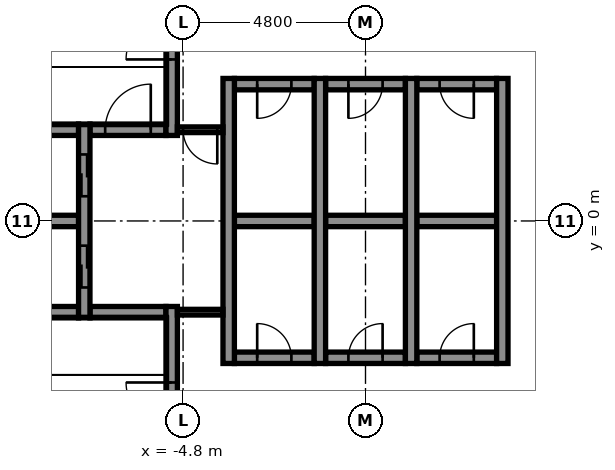
"""IFC4 building model, lengths in metres.
Left out: names, types, materials, properties, quantities, classifications, styles, units other than length and angle.
Written with IfcOpenShell. Run it as: python <this file> out.ifc"""

import sys

from ifc_helpers import new_model, si_unit, direction, frame, frame_2d, origin, place, context, subcontext, project, spatial, rectangle, extrude, element, fill, save


model = new_model("IFC4")
c1 = context("Model", 3, precision=1e-05, world=origin(), true_north=direction((0.0, 1.0)))
c2 = subcontext(c1, "Body", "Model", "MODEL_VIEW")
j1 = project(units=[si_unit("LENGTHUNIT", "METRE"), si_unit("PLANEANGLEUNIT", "RADIAN")], contexts=[c1])
p1 = place(None, origin())
s1 = spatial("IfcSite", under=j1, at=p1, CompositionType="ELEMENT")
p2 = place(p1, origin())
s2 = spatial("IfcBuilding", under=s1, at=p2, CompositionType="ELEMENT")
p3 = place(p2, frame((0.0, 0.0, 66.4)))
s3 = spatial("IfcBuildingStorey", under=s2, at=p3, CompositionType="ELEMENT", Elevation=66.4)
p4 = place(p3, frame((-3.45, -3.6, -0.3), z_axis=(0.0, 0.0, 1.0), x_axis=(1.0, 0.0, 0.0)))
e1 = element("IfcWall", 1, at=p4, inside=s3, PredefinedType="STANDARD", context=c2, shape_type="SweptSolid", body=[
    extrude(rectangle(XDim=2.1, YDim=0.3, at=frame_2d((1.05, 0.0))), origin(), (0.0, 0.0, 1.0), 5.5),
])
p5 = place(p4, frame((0.6, 0.0, 0.3)))
e2 = element("IfcOpeningElement", 2, at=p5, cuts=e1, PredefinedType="OPENING", context=c2, shape_type="SweptSolid", body=[
    extrude(rectangle(XDim=0.9, YDim=2.1, at=frame_2d((0.45, 1.05))), frame((0.0, 0.16, 0.0), z_axis=(0.0, -1.0, 0.0), x_axis=(1.0, 0.0, 0.0)), (0.0, 0.0, 1.0), 0.32),
])
p6 = place(p3, frame((-1.05, -3.6, -0.3), z_axis=(0.0, 0.0, 1.0), x_axis=(1.0, 0.0, 0.0)))
e3 = element("IfcWall", 3, at=p6, inside=s3, PredefinedType="STANDARD", context=c2, shape_type="SweptSolid", body=[
    extrude(rectangle(XDim=2.1, YDim=0.3, at=frame_2d((1.05, 0.0))), origin(), (0.0, 0.0, 1.0), 5.5),
])
p7 = place(p6, frame((0.6, 0.0, 0.3)))
e4 = element("IfcOpeningElement", 4, at=p7, cuts=e3, PredefinedType="OPENING", context=c2, shape_type="SweptSolid", body=[
    extrude(rectangle(XDim=0.9, YDim=2.1, at=frame_2d((0.45, 1.05))), frame((0.0, 0.16, 0.0), z_axis=(0.0, -1.0, 0.0), x_axis=(1.0, 0.0, 0.0)), (0.0, 0.0, 1.0), 0.32),
])
p8 = place(p3, frame((1.35, -3.6, -0.3), z_axis=(0.0, 0.0, 1.0), x_axis=(1.0, 0.0, 0.0)))
e5 = element("IfcWall", 5, at=p8, inside=s3, PredefinedType="STANDARD", context=c2, shape_type="SweptSolid", body=[
    extrude(rectangle(XDim=2.1, YDim=0.3, at=frame_2d((1.05, 0.0))), origin(), (0.0, 0.0, 1.0), 5.5),
])
p9 = place(p8, frame((0.6, 0.0, 0.3)))
e6 = element("IfcOpeningElement", 6, at=p9, cuts=e5, PredefinedType="OPENING", context=c2, shape_type="SweptSolid", body=[
    extrude(rectangle(XDim=0.9, YDim=2.1, at=frame_2d((0.45, 1.05))), frame((0.0, 0.16, 0.0), z_axis=(0.0, -1.0, 0.0), x_axis=(1.0, 0.0, 0.0)), (0.0, 0.0, 1.0), 0.32),
])
p10 = place(p3, frame((-9.45, -2.4, -0.3), z_axis=(0.0, 0.0, 1.0), x_axis=(1.0, 0.0, 0.0)))
e7 = element("IfcWall", 7, at=p10, inside=s3, PredefinedType="STANDARD", context=c2, shape_type="SweptSolid", body=[
    extrude(rectangle(XDim=1.9, YDim=0.3, at=frame_2d((0.95, 0.0))), origin(), (0.0, 0.0, 1.0), 5.5),
])
p11 = place(p3, frame((-7.25, -2.4, -0.3), z_axis=(0.0, 0.0, 1.0), x_axis=(1.0, 0.0, 0.0)))
e8 = element("IfcWall", 8, at=p11, inside=s3, PredefinedType="STANDARD", context=c2, shape_type="SweptSolid", body=[
    extrude(rectangle(XDim=2.0, YDim=0.3, at=frame_2d((1.0, 0.0))), origin(), (0.0, 0.0, 1.0), 5.5),
])
p12 = place(p3, frame((-10.85, 0.0, -0.3), z_axis=(0.0, 0.0, 1.0), x_axis=(1.0, 0.0, 0.0)))
e9 = element("IfcWall", 9, at=p12, inside=s3, PredefinedType="STANDARD", context=c2, shape_type="SweptSolid", body=[
    extrude(rectangle(XDim=3.3, YDim=0.3, at=frame_2d((1.65, 0.0))), origin(), (0.0, 0.0, 1.0), 5.5),
])
p13 = place(p3, frame((-3.45, 0.0, -0.3), z_axis=(0.0, 0.0, 1.0), x_axis=(1.0, 0.0, 0.0)))
e10 = element("IfcWall", 10, at=p13, inside=s3, PredefinedType="STANDARD", context=c2, shape_type="SweptSolid", body=[
    extrude(rectangle(XDim=2.1, YDim=0.3, at=frame_2d((1.05, 0.0))), origin(), (0.0, 0.0, 1.0), 5.5),
])
p14 = place(p3, frame((-1.05, 0.0, -0.3), z_axis=(0.0, 0.0, 1.0), x_axis=(1.0, 0.0, 0.0)))
e11 = element("IfcWall", 11, at=p14, inside=s3, PredefinedType="STANDARD", context=c2, shape_type="SweptSolid", body=[
    extrude(rectangle(XDim=2.1, YDim=0.3, at=frame_2d((1.05, 0.0))), origin(), (0.0, 0.0, 1.0), 5.5),
])
p15 = place(p3, frame((1.35, 0.0, -0.3), z_axis=(0.0, 0.0, 1.0), x_axis=(1.0, 0.0, 0.0)))
e12 = element("IfcWall", 12, at=p15, inside=s3, PredefinedType="STANDARD", context=c2, shape_type="SweptSolid", body=[
    extrude(rectangle(XDim=2.1, YDim=0.3, at=frame_2d((1.05, 0.0))), origin(), (0.0, 0.0, 1.0), 5.5),
])
p16 = place(p3, frame((-9.45, 2.4, -0.3), z_axis=(0.0, 0.0, 1.0), x_axis=(1.0, 0.0, 0.0)))
e13 = element("IfcWall", 13, at=p16, inside=s3, PredefinedType="STANDARD", context=c2, shape_type="SweptSolid", body=[
    extrude(rectangle(XDim=1.9, YDim=0.3, at=frame_2d((0.95, 0.0))), origin(), (0.0, 0.0, 1.0), 5.5),
])
p17 = place(p3, frame((-7.25, 2.4, -0.3), z_axis=(0.0, 0.0, 1.0), x_axis=(1.0, 0.0, 0.0)))
e14 = element("IfcWall", 14, at=p17, inside=s3, PredefinedType="STANDARD", context=c2, shape_type="SweptSolid", body=[
    extrude(rectangle(XDim=2.0, YDim=0.3, at=frame_2d((1.0, 0.0))), origin(), (0.0, 0.0, 1.0), 5.5),
])
p18 = place(p17, frame((0.4, 0.0, 0.3)))
e15 = element("IfcOpeningElement", 15, at=p18, cuts=e14, PredefinedType="OPENING", context=c2, shape_type="SweptSolid", body=[
    extrude(rectangle(XDim=1.2, YDim=2.1, at=frame_2d((0.6, 1.05))), frame((0.0, 0.16, 0.0), z_axis=(0.0, -1.0, 0.0), x_axis=(1.0, 0.0, 0.0)), (0.0, 0.0, 1.0), 0.32),
])
p19 = place(p3, frame((-3.45, 3.6, -0.3), z_axis=(0.0, 0.0, 1.0), x_axis=(1.0, 0.0, 0.0)))
e16 = element("IfcWall", 16, at=p19, inside=s3, PredefinedType="STANDARD", context=c2, shape_type="SweptSolid", body=[
    extrude(rectangle(XDim=2.1, YDim=0.3, at=frame_2d((1.05, 0.0))), origin(), (0.0, 0.0, 1.0), 5.5),
])
p20 = place(p19, frame((0.6, 0.0, 0.3)))
e17 = element("IfcOpeningElement", 17, at=p20, cuts=e16, PredefinedType="OPENING", context=c2, shape_type="SweptSolid", body=[
    extrude(rectangle(XDim=0.9, YDim=2.1, at=frame_2d((0.45, 1.05))), frame((0.0, 0.16, 0.0), z_axis=(0.0, -1.0, 0.0), x_axis=(1.0, 0.0, 0.0)), (0.0, 0.0, 1.0), 0.32),
])
p21 = place(p3, frame((-1.05, 3.6, -0.3), z_axis=(0.0, 0.0, 1.0), x_axis=(1.0, 0.0, 0.0)))
e18 = element("IfcWall", 18, at=p21, inside=s3, PredefinedType="STANDARD", context=c2, shape_type="SweptSolid", body=[
    extrude(rectangle(XDim=2.1, YDim=0.3, at=frame_2d((1.05, 0.0))), origin(), (0.0, 0.0, 1.0), 5.5),
])
p22 = place(p21, frame((0.6, 0.0, 0.3)))
e19 = element("IfcOpeningElement", 19, at=p22, cuts=e18, PredefinedType="OPENING", context=c2, shape_type="SweptSolid", body=[
    extrude(rectangle(XDim=0.9, YDim=2.1, at=frame_2d((0.45, 1.05))), frame((0.0, 0.16, 0.0), z_axis=(0.0, -1.0, 0.0), x_axis=(1.0, 0.0, 0.0)), (0.0, 0.0, 1.0), 0.32),
])
p23 = place(p3, frame((1.35, 3.6, -0.3), z_axis=(0.0, 0.0, 1.0), x_axis=(1.0, 0.0, 0.0)))
e20 = element("IfcWall", 20, at=p23, inside=s3, PredefinedType="STANDARD", context=c2, shape_type="SweptSolid", body=[
    extrude(rectangle(XDim=2.1, YDim=0.3, at=frame_2d((1.05, 0.0))), origin(), (0.0, 0.0, 1.0), 5.5),
])
p24 = place(p23, frame((0.6, 0.0, 0.3)))
e21 = element("IfcOpeningElement", 21, at=p24, cuts=e20, PredefinedType="OPENING", context=c2, shape_type="SweptSolid", body=[
    extrude(rectangle(XDim=0.9, YDim=2.1, at=frame_2d((0.45, 1.05))), frame((0.0, 0.16, 0.0), z_axis=(0.0, -1.0, 0.0), x_axis=(1.0, 0.0, 0.0)), (0.0, 0.0, 1.0), 0.32),
])
p25 = place(p3, frame((-7.4, -2.55, -0.3), z_axis=(0.0, 0.0, 1.0), x_axis=(0.0, 1.0, 0.0)))
e22 = element("IfcWall", 22, at=p25, inside=s3, PredefinedType="STANDARD", context=c2, shape_type="SweptSolid", body=[
    extrude(rectangle(XDim=5.1, YDim=0.3, at=frame_2d((2.55, 0.0))), origin(), (0.0, 0.0, 1.0), 5.5),
])
p26 = place(p25, frame((0.8, 0.0, 0.3)))
e23 = element("IfcOpeningElement", 23, at=p26, cuts=e22, PredefinedType="OPENING", context=c2, shape_type="SweptSolid", body=[
    extrude(rectangle(XDim=1.1, YDim=2.1, at=frame_2d((0.55, 1.05))), frame((0.0, 0.16, 0.0), z_axis=(0.0, -1.0, 0.0), x_axis=(1.0, 0.0, 0.0)), (0.0, 0.0, 1.0), 0.32),
])
p27 = place(p25, frame((3.2, 0.0, 0.3)))
e24 = element("IfcOpeningElement", 24, at=p27, cuts=e22, PredefinedType="OPENING", context=c2, shape_type="SweptSolid", body=[
    extrude(rectangle(XDim=1.1, YDim=2.1, at=frame_2d((0.55, 1.05))), frame((0.0, 0.16, 0.0), z_axis=(0.0, -1.0, 0.0), x_axis=(1.0, 0.0, 0.0)), (0.0, 0.0, 1.0), 0.32),
])
p28 = place(p3, frame((-5.1, -9.05, -0.3), z_axis=(0.0, 0.0, 1.0), x_axis=(0.0, 1.0, 0.0)))
e25 = element("IfcWall", 25, at=p28, inside=s3, PredefinedType="STANDARD", context=c2, shape_type="SweptSolid", body=[
    extrude(rectangle(XDim=6.8, YDim=0.3, at=frame_2d((3.4, 0.0))), origin(), (0.0, 0.0, 1.0), 5.5),
])
p29 = place(p28, frame((3.6, 0.0, 0.3)))
e26 = element("IfcOpeningElement", 26, at=p29, cuts=e25, PredefinedType="OPENING", context=c2, shape_type="SweptSolid", body=[
    extrude(rectangle(XDim=1.2, YDim=2.1, at=frame_2d((0.6, 1.05))), frame((0.0, 0.16, 0.0), z_axis=(0.0, -1.0, 0.0), x_axis=(1.0, 0.0, 0.0)), (0.0, 0.0, 1.0), 0.32),
])
p30 = place(p3, frame((-5.1, 2.25, -0.3), z_axis=(0.0, 0.0, 1.0), x_axis=(0.0, 1.0, 0.0)))
e27 = element("IfcWall", 27, at=p30, inside=s3, PredefinedType="STANDARD", context=c2, shape_type="SweptSolid", body=[
    extrude(rectangle(XDim=6.8, YDim=0.3, at=frame_2d((3.4, 0.0))), origin(), (0.0, 0.0, 1.0), 5.5),
])
p31 = place(p30, frame((2.0, 0.0, 0.3)))
e28 = element("IfcOpeningElement", 28, at=p31, cuts=e27, PredefinedType="OPENING", context=c2, shape_type="SweptSolid", body=[
    extrude(rectangle(XDim=1.2, YDim=2.1, at=frame_2d((0.6, 1.05))), frame((0.0, 0.16, 0.0), z_axis=(0.0, -1.0, 0.0), x_axis=(1.0, 0.0, 0.0)), (0.0, 0.0, 1.0), 0.32),
])
for number, where, z_axis, x_axis in (
    (29, (-3.6, -3.75, -0.3), (0.0, 0.0, 1.0), (0.0, 1.0, 0.0)),
    (30, (-1.2, -3.75, -0.3), (0.0, 0.0, 1.0), (0.0, 1.0, 0.0)),
    (31, (1.2, -3.75, -0.3), (0.0, 0.0, 1.0), (0.0, 1.0, 0.0)),
    (32, (3.6, -3.75, -0.3), (0.0, 0.0, 1.0), (0.0, 1.0, 0.0)),
):
    element("IfcWall", number, at=place(p3, frame(where, z_axis=z_axis, x_axis=x_axis)), inside=s3, PredefinedType="STANDARD", context=c2, shape_type="SweptSolid", body=[
        extrude(rectangle(XDim=7.5, YDim=0.3, at=frame_2d((3.75, 0.0))), origin(), (0.0, 0.0, 1.0), 5.5),
    ])
p32 = place(p3, frame((-4.95, 2.4, 0.0), z_axis=(0.0, 0.0, 1.0), x_axis=(1.0, 0.0, 0.0)))
e33 = element("IfcWall", 33, at=p32, inside=s3, PredefinedType="PARTITIONING", context=c2, shape_type="SweptSolid", body=[
    extrude(rectangle(XDim=1.2, YDim=0.15, at=frame_2d((0.6, 0.0))), origin(), (0.0, 0.0, 1.0), 5.2),
])
p33 = place(p32, frame((0.15, 0.0, 0.0)))
e34 = element("IfcOpeningElement", 34, at=p33, cuts=e33, PredefinedType="OPENING", context=c2, shape_type="SweptSolid", body=[
    extrude(rectangle(XDim=0.9, YDim=2.1, at=frame_2d((0.45, 1.05))), frame((0.0, 0.085, 0.0), z_axis=(0.0, -1.0, 0.0), x_axis=(1.0, 0.0, 0.0)), (0.0, 0.0, 1.0), 0.17),
])
p34 = place(p3, frame((-4.95, -2.4, 0.0), z_axis=(0.0, 0.0, 1.0), x_axis=(1.0, 0.0, 0.0)))
e35 = element("IfcWall", 35, at=p34, inside=s3, PredefinedType="PARTITIONING", context=c2, shape_type="SweptSolid", body=[
    extrude(rectangle(XDim=1.2, YDim=0.15, at=frame_2d((0.6, 0.0))), origin(), (0.0, 0.0, 1.0), 5.2),
])
p35 = place(p26, origin())
e36 = element("IfcDoor", 36, at=p35, inside=s3, OperationType="DOUBLE_DOOR_SLIDING", PredefinedType="DOOR", context=c2, shape_type="SweptSolid", body=[
    extrude(rectangle(XDim=1.1, YDim=2.1, at=frame_2d((0.55, 1.05))), frame((0.0, 0.025, 0.0), z_axis=(0.0, -1.0, 0.0), x_axis=(1.0, 0.0, 0.0)), (0.0, 0.0, 1.0), 0.05),
])
fill(e23, e36)
p36 = place(p27, origin())
e37 = element("IfcDoor", 37, at=p36, inside=s3, OperationType="DOUBLE_DOOR_SLIDING", PredefinedType="DOOR", context=c2, shape_type="SweptSolid", body=[
    extrude(rectangle(XDim=1.1, YDim=2.1, at=frame_2d((0.55, 1.05))), frame((0.0, 0.025, 0.0), z_axis=(0.0, -1.0, 0.0), x_axis=(1.0, 0.0, 0.0)), (0.0, 0.0, 1.0), 0.05),
])
fill(e24, e37)
p37 = place(p31, origin())
e38 = element("IfcDoor", 38, at=p37, inside=s3, OperationType="SINGLE_SWING_LEFT", PredefinedType="DOOR", context=c2, shape_type="SweptSolid", body=[
    extrude(rectangle(XDim=1.2, YDim=2.1, at=frame_2d((0.6, 1.05))), frame((0.0, 0.025, 0.0), z_axis=(0.0, -1.0, 0.0), x_axis=(1.0, 0.0, 0.0)), (0.0, 0.0, 1.0), 0.05),
])
fill(e28, e38)
p38 = place(p29, origin())
e39 = element("IfcDoor", 39, at=p38, inside=s3, OperationType="SINGLE_SWING_RIGHT", PredefinedType="DOOR", context=c2, shape_type="SweptSolid", body=[
    extrude(rectangle(XDim=1.2, YDim=2.1, at=frame_2d((0.6, 1.05))), frame((0.0, 0.025, 0.0), z_axis=(0.0, -1.0, 0.0), x_axis=(1.0, 0.0, 0.0)), (0.0, 0.0, 1.0), 0.05),
])
fill(e26, e39)
p39 = place(p20, frame((0.9, 0.0, 0.0), z_axis=(0.0, 0.0, 1.0), x_axis=(-1.0, 0.0, 0.0)))
e40 = element("IfcDoor", 40, at=p39, inside=s3, OperationType="SINGLE_SWING_LEFT", PredefinedType="DOOR", context=c2, shape_type="SweptSolid", body=[
    extrude(rectangle(XDim=0.9, YDim=2.1, at=frame_2d((0.45, 1.05))), frame((0.0, 0.025, 0.0), z_axis=(0.0, -1.0, 0.0), x_axis=(1.0, 0.0, 0.0)), (0.0, 0.0, 1.0), 0.05),
])
fill(e17, e40)
p40 = place(p22, frame((0.9, 0.0, 0.0), z_axis=(0.0, 0.0, 1.0), x_axis=(-1.0, 0.0, 0.0)))
e41 = element("IfcDoor", 41, at=p40, inside=s3, OperationType="SINGLE_SWING_LEFT", PredefinedType="DOOR", context=c2, shape_type="SweptSolid", body=[
    extrude(rectangle(XDim=0.9, YDim=2.1, at=frame_2d((0.45, 1.05))), frame((0.0, 0.025, 0.0), z_axis=(0.0, -1.0, 0.0), x_axis=(1.0, 0.0, 0.0)), (0.0, 0.0, 1.0), 0.05),
])
fill(e19, e41)
p41 = place(p24, frame((0.9, 0.0, 0.0), z_axis=(0.0, 0.0, 1.0), x_axis=(-1.0, 0.0, 0.0)))
e42 = element("IfcDoor", 42, at=p41, inside=s3, OperationType="SINGLE_SWING_RIGHT", PredefinedType="DOOR", context=c2, shape_type="SweptSolid", body=[
    extrude(rectangle(XDim=0.9, YDim=2.1, at=frame_2d((0.45, 1.05))), frame((0.0, 0.025, 0.0), z_axis=(0.0, -1.0, 0.0), x_axis=(1.0, 0.0, 0.0)), (0.0, 0.0, 1.0), 0.05),
])
fill(e21, e42)
p42 = place(p5, origin())
e43 = element("IfcDoor", 43, at=p42, inside=s3, OperationType="SINGLE_SWING_LEFT", PredefinedType="DOOR", context=c2, shape_type="SweptSolid", body=[
    extrude(rectangle(XDim=0.9, YDim=2.1, at=frame_2d((0.45, 1.05))), frame((0.0, 0.025, 0.0), z_axis=(0.0, -1.0, 0.0), x_axis=(1.0, 0.0, 0.0)), (0.0, 0.0, 1.0), 0.05),
])
fill(e2, e43)
p43 = place(p7, origin())
e44 = element("IfcDoor", 44, at=p43, inside=s3, OperationType="SINGLE_SWING_RIGHT", PredefinedType="DOOR", context=c2, shape_type="SweptSolid", body=[
    extrude(rectangle(XDim=0.9, YDim=2.1, at=frame_2d((0.45, 1.05))), frame((0.0, 0.025, 0.0), z_axis=(0.0, -1.0, 0.0), x_axis=(1.0, 0.0, 0.0)), (0.0, 0.0, 1.0), 0.05),
])
fill(e4, e44)
p44 = place(p9, origin())
e45 = element("IfcDoor", 45, at=p44, inside=s3, OperationType="SINGLE_SWING_RIGHT", PredefinedType="DOOR", context=c2, shape_type="SweptSolid", body=[
    extrude(rectangle(XDim=0.9, YDim=2.1, at=frame_2d((0.45, 1.05))), frame((0.0, 0.025, 0.0), z_axis=(0.0, -1.0, 0.0), x_axis=(1.0, 0.0, 0.0)), (0.0, 0.0, 1.0), 0.05),
])
fill(e6, e45)
p45 = place(p33, frame((0.9, 0.0, 0.0), z_axis=(0.0, 0.0, 1.0), x_axis=(-1.0, 0.0, 0.0)))
e46 = element("IfcDoor", 46, at=p45, inside=s3, OperationType="SINGLE_SWING_RIGHT", PredefinedType="DOOR", context=c2, shape_type="SweptSolid", body=[
    extrude(rectangle(XDim=0.9, YDim=2.1, at=frame_2d((0.45, 1.05))), frame((0.0, 0.025, 0.0), z_axis=(0.0, -1.0, 0.0), x_axis=(1.0, 0.0, 0.0)), (0.0, 0.0, 1.0), 0.05),
])
fill(e34, e46)
p46 = place(p18, origin())
e47 = element("IfcDoor", 47, at=p46, inside=s3, OperationType="SINGLE_SWING_RIGHT", PredefinedType="DOOR", context=c2, shape_type="SweptSolid", body=[
    extrude(rectangle(XDim=1.2, YDim=2.1, at=frame_2d((0.6, 1.05))), frame((0.0, 0.025, 0.0), z_axis=(0.0, -1.0, 0.0), x_axis=(1.0, 0.0, 0.0)), (0.0, 0.0, 1.0), 0.05),
])
fill(e15, e47)
save(model, sys.argv[1])
